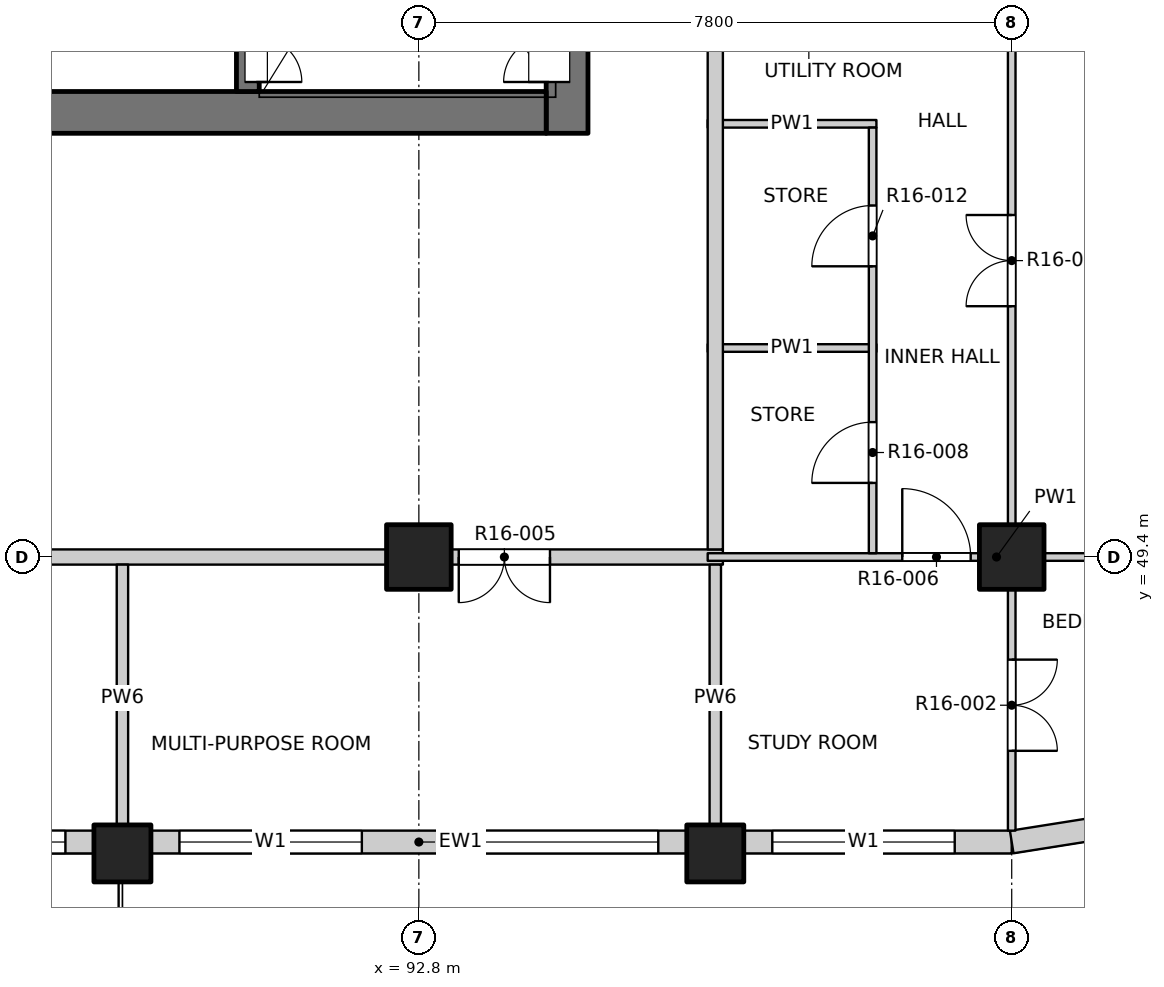
"""IFC4 building model, lengths in metres.
Left out: names, types, materials, properties, quantities, classifications, styles, units other than length and angle.
Written with IfcOpenShell. Run it as: python <this file> out.ifc"""

import sys

from ifc_helpers import new_model, si_unit, direction, frame, frame_2d, origin, origin_2d, place, context, subcontext, project, spatial, rectangle, extrude, element, fill, save


model = new_model("IFC4")
c1 = context("Model", 3, precision=1e-05, world=origin(), true_north=direction((0.0, 1.0)))
c2 = subcontext(c1, "Body", "Model", "MODEL_VIEW")
j1 = project(units=[si_unit("LENGTHUNIT", "METRE"), si_unit("PLANEANGLEUNIT", "RADIAN")], contexts=[c1])
p1 = place(None, origin())
s1 = spatial("IfcSite", under=j1, at=p1, CompositionType="ELEMENT")
p2 = place(p1, origin())
s2 = spatial("IfcBuilding", under=s1, at=p2, CompositionType="ELEMENT")
p3 = place(p2, frame((0.0, 0.0, 169.0)))
s3 = spatial("IfcBuildingStorey", under=s2, at=p3, CompositionType="ELEMENT", Elevation=169.0)
for number, where, z_axis, x_axis in (
    (1, (88.9, 45.5, -0.25), (0.0, 0.0, 1.0), (1.0, 0.0, 0.0)),
    (2, (96.7, 45.5, -0.25), (0.0, 0.0, 1.0), (1.0, 0.0, 0.0)),
):
    element("IfcColumn", number, at=place(p3, frame(where, z_axis=z_axis, x_axis=x_axis)), inside=s3, PredefinedType="COLUMN", context=c2, shape_type="SweptSolid", body=[
        extrude(rectangle(XDim=0.75, YDim=0.75, at=origin_2d()), origin(), (0.0, 0.0, 1.0), 3.35),
    ])
for number, where, z_axis, x_axis in (
    (3, (92.8, 49.4, -0.25), (0.0, 0.0, 1.0), (1.0, 0.0, 0.0)),
    (4, (100.6, 49.4, -0.25), (0.0, 0.0, 1.0), (1.0, 0.0, 0.0)),
):
    element("IfcColumn", number, at=place(p3, frame(where, z_axis=z_axis, x_axis=x_axis)), inside=s3, PredefinedType="COLUMN", context=c2, shape_type="SweptSolid", body=[
        extrude(rectangle(XDim=0.85, YDim=0.85, at=origin_2d()), origin(), (0.0, 0.0, 1.0), 3.35),
    ])
p4 = place(p3, frame((94.75, 54.975, -0.25), z_axis=(0.0, 0.0, 1.0), x_axis=(0.0, 1.0, 0.0)))
e5 = element("IfcWall", 5, at=p4, inside=s3, PredefinedType="SOLIDWALL", context=c2, shape_type="SweptSolid", body=[
    extrude(rectangle(XDim=6.975, YDim=0.55, at=frame_2d((3.487, 0.0))), origin(), (0.0, 0.0, 1.0), 3.35),
])
p5 = place(p4, frame((0.675, 0.0, 0.25)))
e6 = element("IfcOpeningElement", 6, at=p5, cuts=e5, PredefinedType="OPENING", context=c2, shape_type="SweptSolid", body=[
    extrude(rectangle(XDim=1.2, YDim=2.1, at=frame_2d((0.6, 1.05))), frame((0.0, 0.285, 0.0), z_axis=(0.0, -1.0, 0.0), x_axis=(1.0, 0.0, 0.0)), (0.0, 0.0, 1.0), 0.57),
])
p6 = place(p3, frame((75.525, 55.25, -0.25), z_axis=(0.0, 0.0, 1.0), x_axis=(1.0, 0.0, 0.0)))
e7 = element("IfcWall", 7, at=p6, inside=s3, PredefinedType="SOLIDWALL", context=c2, shape_type="SweptSolid", body=[
    extrude(rectangle(XDim=18.95, YDim=0.55, at=frame_2d((9.475, 0.0))), origin(), (0.0, 0.0, 1.0), 3.35),
])
p7 = place(p6, frame((8.725, 0.0, 0.25)))
e8 = element("IfcOpeningElement", 8, at=p7, cuts=e7, PredefinedType="OPENING", context=c2, shape_type="SweptSolid", body=[
    extrude(rectangle(XDim=1.5, YDim=2.1, at=frame_2d((0.75, 1.05))), frame((0.0, 0.285, 0.0), z_axis=(0.0, -1.0, 0.0), x_axis=(1.0, 0.0, 0.0)), (0.0, 0.0, 1.0), 0.57),
])
p8 = place(p3, frame((90.55, 55.525, -0.25), z_axis=(0.0, 0.0, 1.0), x_axis=(0.0, 1.0, 0.0)))
e9 = element("IfcWall", 9, at=p8, inside=s3, PredefinedType="SOLIDWALL", context=c2, shape_type="SweptSolid", body=[
    extrude(rectangle(XDim=6.425, YDim=0.3, at=frame_2d((3.212, 0.0))), origin(), (0.0, 0.0, 1.0), 3.35),
])
p9 = place(p8, frame((0.125, 0.0, 0.25)))
e10 = element("IfcOpeningElement", 10, at=p9, cuts=e9, PredefinedType="OPENING", context=c2, shape_type="SweptSolid", body=[
    extrude(rectangle(XDim=1.2, YDim=2.1, at=frame_2d((0.6, 1.05))), frame((0.0, 0.16, 0.0), z_axis=(0.0, -1.0, 0.0), x_axis=(1.0, 0.0, 0.0)), (0.0, 0.0, 1.0), 0.32),
])
p10 = place(p3, frame((81.475, 45.65, 0.0), z_axis=(0.0, 0.0, 1.0), x_axis=(1.0, 0.0, 0.0)))
e11 = element("IfcWall", 11, at=p10, inside=s3, PredefinedType="SOLIDWALL", context=c2, shape_type="SweptSolid", body=[
    extrude(rectangle(XDim=7.05, YDim=0.3, at=frame_2d((3.525, 0.0))), origin(), (0.0, 0.0, 1.0), 3.1),
])
p11 = place(p10, frame((0.675, 0.0, 0.0)))
e12 = element("IfcOpeningElement", 12, at=p11, cuts=e11, PredefinedType="OPENING", context=c2, shape_type="SweptSolid", body=[
    extrude(rectangle(XDim=1.8, YDim=2.4, at=frame_2d((0.9, 1.2))), frame((0.0, 0.16, 0.0), z_axis=(0.0, -1.0, 0.0), x_axis=(1.0, 0.0, 0.0)), (0.0, 0.0, 1.0), 0.32),
])
p12 = place(p10, frame((4.275, 0.0, 0.9)))
e13 = element("IfcOpeningElement", 13, at=p12, cuts=e11, PredefinedType="OPENING", context=c2, shape_type="SweptSolid", body=[
    extrude(rectangle(XDim=2.4, YDim=1.8, at=frame_2d((1.2, 0.9))), frame((0.0, 0.16, 0.0), z_axis=(0.0, -1.0, 0.0), x_axis=(1.0, 0.0, 0.0)), (0.0, 0.0, 1.0), 0.32),
])
p13 = place(p3, frame((89.275, 45.65, 0.0), z_axis=(0.0, 0.0, 1.0), x_axis=(1.0, 0.0, 0.0)))
e14 = element("IfcWall", 14, at=p13, inside=s3, PredefinedType="SOLIDWALL", context=c2, shape_type="SweptSolid", body=[
    extrude(rectangle(XDim=7.05, YDim=0.3, at=frame_2d((3.525, 0.0))), origin(), (0.0, 0.0, 1.0), 3.1),
])
p14 = place(p13, frame((0.375, 0.0, 0.9)))
e15 = element("IfcOpeningElement", 15, at=p14, cuts=e14, PredefinedType="OPENING", context=c2, shape_type="SweptSolid", body=[
    extrude(rectangle(XDim=2.4, YDim=1.8, at=frame_2d((1.2, 0.9))), frame((0.0, 0.16, 0.0), z_axis=(0.0, -1.0, 0.0), x_axis=(1.0, 0.0, 0.0)), (0.0, 0.0, 1.0), 0.32),
])
p15 = place(p13, frame((4.275, 0.0, 0.9)))
e16 = element("IfcOpeningElement", 16, at=p15, cuts=e14, PredefinedType="OPENING", context=c2, shape_type="SweptSolid", body=[
    extrude(rectangle(XDim=2.4, YDim=1.8, at=frame_2d((1.2, 0.9))), frame((0.0, 0.16, 0.0), z_axis=(0.0, -1.0, 0.0), x_axis=(1.0, 0.0, 0.0)), (0.0, 0.0, 1.0), 0.32),
])
p16 = place(p3, frame((97.075, 45.65, 0.0), z_axis=(0.0, 0.0, 1.0), x_axis=(1.0, 0.0, 0.0)))
e17 = element("IfcWall", 17, at=p16, inside=s3, PredefinedType="SOLIDWALL", context=c2, shape_type="SweptSolid", body=[
    extrude(rectangle(XDim=3.525, YDim=0.3, at=frame_2d((1.763, 0.0))), origin(), (0.0, 0.0, 1.0), 3.1),
])
p17 = place(p16, frame((0.375, 0.0, 0.9)))
e18 = element("IfcOpeningElement", 18, at=p17, cuts=e17, PredefinedType="OPENING", context=c2, shape_type="SweptSolid", body=[
    extrude(rectangle(XDim=2.4, YDim=1.8, at=frame_2d((1.2, 0.9))), frame((0.0, 0.16, 0.0), z_axis=(0.0, -1.0, 0.0), x_axis=(1.0, 0.0, 0.0)), (0.0, 0.0, 1.0), 0.32),
])
p18 = place(p3, frame((100.6, 45.65, 0.0), z_axis=(0.0, 0.0, 1.0), x_axis=(0.987678452879, 0.156496880861, 0.0)))
e19 = element("IfcWall", 19, at=p18, inside=s3, PredefinedType="SOLIDWALL", context=c2, shape_type="SweptSolid", body=[
    extrude(rectangle(XDim=1.173, YDim=0.3, at=frame_2d((0.586, 0.0))), origin(), (0.0, 0.0, 1.0), 3.1),
])
p19 = place(p3, frame((73.2, 49.4, 0.0), z_axis=(0.0, 0.0, 1.0), x_axis=(1.0, 0.0, 0.0)))
e20 = element("IfcWall", 20, at=p19, inside=s3, PredefinedType="PARTITIONING", context=c2, shape_type="SweptSolid", body=[
    extrude(rectangle(XDim=23.6, YDim=0.2, at=frame_2d((11.8, 0.0))), origin(), (0.0, 0.0, 1.0), 3.1),
])
p20 = place(p19, frame((7.3, 0.0, 0.0)))
e21 = element("IfcOpeningElement", 21, at=p20, cuts=e20, PredefinedType="OPENING", context=c2, shape_type="SweptSolid", body=[
    extrude(rectangle(XDim=1.2, YDim=2.1, at=frame_2d((0.6, 1.05))), frame((0.0, 0.11, 0.0), z_axis=(0.0, -1.0, 0.0), x_axis=(1.0, 0.0, 0.0)), (0.0, 0.0, 1.0), 0.22),
])
p21 = place(p19, frame((20.125, 0.0, 0.0)))
e22 = element("IfcOpeningElement", 22, at=p21, cuts=e20, PredefinedType="OPENING", context=c2, shape_type="SweptSolid", body=[
    extrude(rectangle(XDim=1.2, YDim=2.1, at=frame_2d((0.6, 1.05))), frame((0.0, 0.11, 0.0), z_axis=(0.0, -1.0, 0.0), x_axis=(1.0, 0.0, 0.0)), (0.0, 0.0, 1.0), 0.22),
])
p22 = place(p3, frame((96.6, 49.4, 0.0), z_axis=(0.0, 0.0, 1.0), x_axis=(1.0, 0.0, 0.0)))
e23 = element("IfcWall", 23, at=p22, inside=s3, PredefinedType="PARTITIONING", context=c2, shape_type="SweptSolid", body=[
    extrude(rectangle(XDim=7.6, YDim=0.1, at=frame_2d((3.8, 0.0))), origin(), (0.0, 0.0, 1.0), 3.1),
])
p23 = place(p22, frame((2.56, 0.0, 0.0)))
e24 = element("IfcOpeningElement", 24, at=p23, cuts=e23, PredefinedType="OPENING", context=c2, shape_type="SweptSolid", body=[
    extrude(rectangle(XDim=0.9, YDim=2.1, at=frame_2d((0.45, 1.05))), frame((0.0, 0.06, 0.0), z_axis=(0.0, -1.0, 0.0), x_axis=(1.0, 0.0, 0.0)), (0.0, 0.0, 1.0), 0.12),
])
for number, where, z_axis, x_axis in (
    (25, (96.6, 52.15, 0.0), (0.0, 0.0, 1.0), (1.0, 0.0, 0.0)),
    (26, (96.6, 55.1, 0.0), (0.0, 0.0, 1.0), (1.0, 0.0, 0.0)),
):
    element("IfcWall", number, at=place(p3, frame(where, z_axis=z_axis, x_axis=x_axis)), inside=s3, PredefinedType="PARTITIONING", context=c2, shape_type="SweptSolid", body=[
        extrude(rectangle(XDim=2.22, YDim=0.1, at=frame_2d((1.11, 0.0))), origin(), (0.0, 0.0, 1.0), 3.1),
    ])
for number, where, z_axis, x_axis in (
    (27, (88.9, 45.8, 0.0), (0.0, 0.0, 1.0), (0.0, 1.0, 0.0)),
    (28, (96.7, 45.8, 0.0), (0.0, 0.0, 1.0), (0.0, 1.0, 0.0)),
):
    element("IfcWall", number, at=place(p3, frame(where, z_axis=z_axis, x_axis=x_axis)), inside=s3, PredefinedType="PARTITIONING", context=c2, shape_type="SweptSolid", body=[
        extrude(rectangle(XDim=3.5, YDim=0.15, at=frame_2d((1.75, 0.0))), origin(), (0.0, 0.0, 1.0), 3.1),
    ])
p24 = place(p3, frame((96.7, 49.5, 0.0), z_axis=(0.0, 0.0, 1.0), x_axis=(0.0, 1.0, 0.0)))
e29 = element("IfcWall", 29, at=p24, inside=s3, PredefinedType="PARTITIONING", context=c2, shape_type="SweptSolid", body=[
    extrude(rectangle(XDim=34.7, YDim=0.2, at=frame_2d((17.35, 0.0))), origin(), (0.0, 0.0, 1.0), 3.1),
])
p25 = place(p24, frame((6.875, 0.0, 0.0)))
e30 = element("IfcOpeningElement", 30, at=p25, cuts=e29, PredefinedType="OPENING", context=c2, shape_type="SweptSolid", body=[
    extrude(rectangle(XDim=1.0, YDim=2.1, at=frame_2d((0.5, 1.05))), frame((0.0, 0.11, 0.0), z_axis=(0.0, -1.0, 0.0), x_axis=(1.0, 0.0, 0.0)), (0.0, 0.0, 1.0), 0.22),
])
p26 = place(p24, frame((18.025, 0.0, 0.0)))
e31 = element("IfcOpeningElement", 31, at=p26, cuts=e29, PredefinedType="OPENING", context=c2, shape_type="SweptSolid", body=[
    extrude(rectangle(XDim=1.0, YDim=2.1, at=frame_2d((0.5, 1.05))), frame((0.0, 0.11, 0.0), z_axis=(0.0, -1.0, 0.0), x_axis=(1.0, 0.0, 0.0)), (0.0, 0.0, 1.0), 0.22),
])
p27 = place(p3, frame((98.77, 49.45, 0.0), z_axis=(0.0, 0.0, 1.0), x_axis=(0.0, 1.0, 0.0)))
e32 = element("IfcWall", 32, at=p27, inside=s3, PredefinedType="PARTITIONING", context=c2, shape_type="SweptSolid", body=[
    extrude(rectangle(XDim=5.6, YDim=0.1, at=frame_2d((2.8, 0.0))), origin(), (0.0, 0.0, 1.0), 3.1),
])
p28 = place(p27, frame((0.925, 0.0, 0.0)))
e33 = element("IfcOpeningElement", 33, at=p28, cuts=e32, PredefinedType="OPENING", context=c2, shape_type="SweptSolid", body=[
    extrude(rectangle(XDim=0.8, YDim=2.1, at=frame_2d((0.4, 1.05))), frame((0.0, 0.06, 0.0), z_axis=(0.0, -1.0, 0.0), x_axis=(1.0, 0.0, 0.0)), (0.0, 0.0, 1.0), 0.12),
])
p29 = place(p27, frame((3.775, 0.0, 0.0)))
e34 = element("IfcOpeningElement", 34, at=p29, cuts=e32, PredefinedType="OPENING", context=c2, shape_type="SweptSolid", body=[
    extrude(rectangle(XDim=0.8, YDim=2.1, at=frame_2d((0.4, 1.05))), frame((0.0, 0.06, 0.0), z_axis=(0.0, -1.0, 0.0), x_axis=(1.0, 0.0, 0.0)), (0.0, 0.0, 1.0), 0.12),
])
p30 = place(p3, frame((100.6, 45.8, 0.0), z_axis=(0.0, 0.0, 1.0), x_axis=(0.0, 1.0, 0.0)))
e35 = element("IfcWall", 35, at=p30, inside=s3, PredefinedType="PARTITIONING", context=c2, shape_type="SweptSolid", body=[
    extrude(rectangle(XDim=38.4, YDim=0.1, at=frame_2d((19.2, 0.0))), origin(), (0.0, 0.0, 1.0), 3.1),
])
p31 = place(p30, frame((1.05, 0.0, 0.0)))
e36 = element("IfcOpeningElement", 36, at=p31, cuts=e35, PredefinedType="OPENING", context=c2, shape_type="SweptSolid", body=[
    extrude(rectangle(XDim=1.2, YDim=2.1, at=frame_2d((0.6, 1.05))), frame((0.0, 0.06, 0.0), z_axis=(0.0, -1.0, 0.0), x_axis=(1.0, 0.0, 0.0)), (0.0, 0.0, 1.0), 0.12),
])
p32 = place(p30, frame((6.9, 0.0, 0.0)))
e37 = element("IfcOpeningElement", 37, at=p32, cuts=e35, PredefinedType="OPENING", context=c2, shape_type="SweptSolid", body=[
    extrude(rectangle(XDim=1.2, YDim=2.1, at=frame_2d((0.6, 1.05))), frame((0.0, 0.06, 0.0), z_axis=(0.0, -1.0, 0.0), x_axis=(1.0, 0.0, 0.0)), (0.0, 0.0, 1.0), 0.12),
])
p33 = place(p30, frame((12.9, 0.0, 0.0)))
e38 = element("IfcOpeningElement", 38, at=p33, cuts=e35, PredefinedType="OPENING", context=c2, shape_type="SweptSolid", body=[
    extrude(rectangle(XDim=0.9, YDim=2.1, at=frame_2d((0.45, 1.05))), frame((0.0, 0.06, 0.0), z_axis=(0.0, -1.0, 0.0), x_axis=(1.0, 0.0, 0.0)), (0.0, 0.0, 1.0), 0.12),
])
p34 = place(p30, frame((16.8, 0.0, 0.0)))
e39 = element("IfcOpeningElement", 39, at=p34, cuts=e35, PredefinedType="OPENING", context=c2, shape_type="SweptSolid", body=[
    extrude(rectangle(XDim=0.9, YDim=2.1, at=frame_2d((0.45, 1.05))), frame((0.0, 0.06, 0.0), z_axis=(0.0, -1.0, 0.0), x_axis=(1.0, 0.0, 0.0)), (0.0, 0.0, 1.0), 0.12),
])
p35 = place(p30, frame((20.7, 0.0, 0.0)))
e40 = element("IfcOpeningElement", 40, at=p35, cuts=e35, PredefinedType="OPENING", context=c2, shape_type="SweptSolid", body=[
    extrude(rectangle(XDim=0.9, YDim=2.1, at=frame_2d((0.45, 1.05))), frame((0.0, 0.06, 0.0), z_axis=(0.0, -1.0, 0.0), x_axis=(1.0, 0.0, 0.0)), (0.0, 0.0, 1.0), 0.12),
])
p36 = place(p30, frame((24.6, 0.0, 0.0)))
e41 = element("IfcOpeningElement", 41, at=p36, cuts=e35, PredefinedType="OPENING", context=c2, shape_type="SweptSolid", body=[
    extrude(rectangle(XDim=0.9, YDim=2.1, at=frame_2d((0.45, 1.05))), frame((0.0, 0.06, 0.0), z_axis=(0.0, -1.0, 0.0), x_axis=(1.0, 0.0, 0.0)), (0.0, 0.0, 1.0), 0.12),
])
p37 = place(p30, frame((28.5, 0.0, 0.0)))
e42 = element("IfcOpeningElement", 42, at=p37, cuts=e35, PredefinedType="OPENING", context=c2, shape_type="SweptSolid", body=[
    extrude(rectangle(XDim=0.9, YDim=2.1, at=frame_2d((0.45, 1.05))), frame((0.0, 0.06, 0.0), z_axis=(0.0, -1.0, 0.0), x_axis=(1.0, 0.0, 0.0)), (0.0, 0.0, 1.0), 0.12),
])
p38 = place(p30, frame((32.4, 0.0, 0.0)))
e43 = element("IfcOpeningElement", 43, at=p38, cuts=e35, PredefinedType="OPENING", context=c2, shape_type="SweptSolid", body=[
    extrude(rectangle(XDim=0.9, YDim=2.1, at=frame_2d((0.45, 1.05))), frame((0.0, 0.06, 0.0), z_axis=(0.0, -1.0, 0.0), x_axis=(1.0, 0.0, 0.0)), (0.0, 0.0, 1.0), 0.12),
])
p39 = place(p30, frame((36.15, 0.0, 0.0)))
e44 = element("IfcOpeningElement", 44, at=p39, cuts=e35, PredefinedType="OPENING", context=c2, shape_type="SweptSolid", body=[
    extrude(rectangle(XDim=1.2, YDim=2.1, at=frame_2d((0.6, 1.05))), frame((0.0, 0.06, 0.0), z_axis=(0.0, -1.0, 0.0), x_axis=(1.0, 0.0, 0.0)), (0.0, 0.0, 1.0), 0.12),
])
p40 = place(p12, origin())
e45 = element("IfcWindow", 45, at=p40, inside=s3, PartitioningType="DOUBLE_PANEL_VERTICAL", PredefinedType="WINDOW", context=c2, shape_type="SweptSolid", body=[
    extrude(rectangle(XDim=2.4, YDim=1.8, at=frame_2d((1.2, 0.9))), frame((0.0, 0.03, 0.0), z_axis=(0.0, -1.0, 0.0), x_axis=(1.0, 0.0, 0.0)), (0.0, 0.0, 1.0), 0.06),
])
fill(e13, e45)
p41 = place(p14, origin())
e46 = element("IfcWindow", 46, at=p41, inside=s3, PartitioningType="DOUBLE_PANEL_VERTICAL", PredefinedType="WINDOW", context=c2, shape_type="SweptSolid", body=[
    extrude(rectangle(XDim=2.4, YDim=1.8, at=frame_2d((1.2, 0.9))), frame((0.0, 0.03, 0.0), z_axis=(0.0, -1.0, 0.0), x_axis=(1.0, 0.0, 0.0)), (0.0, 0.0, 1.0), 0.06),
])
fill(e15, e46)
p42 = place(p15, origin())
e47 = element("IfcWindow", 47, at=p42, inside=s3, PartitioningType="DOUBLE_PANEL_VERTICAL", PredefinedType="WINDOW", context=c2, shape_type="SweptSolid", body=[
    extrude(rectangle(XDim=2.4, YDim=1.8, at=frame_2d((1.2, 0.9))), frame((0.0, 0.03, 0.0), z_axis=(0.0, -1.0, 0.0), x_axis=(1.0, 0.0, 0.0)), (0.0, 0.0, 1.0), 0.06),
])
fill(e16, e47)
p43 = place(p17, origin())
e48 = element("IfcWindow", 48, at=p43, inside=s3, PartitioningType="DOUBLE_PANEL_VERTICAL", PredefinedType="WINDOW", context=c2, shape_type="SweptSolid", body=[
    extrude(rectangle(XDim=2.4, YDim=1.8, at=frame_2d((1.2, 0.9))), frame((0.0, 0.03, 0.0), z_axis=(0.0, -1.0, 0.0), x_axis=(1.0, 0.0, 0.0)), (0.0, 0.0, 1.0), 0.06),
])
fill(e18, e48)
p44 = place(p31, origin())
e49 = element("IfcDoor", 49, at=p44, inside=s3, OperationType="DOUBLE_DOOR_SINGLE_SWING", PredefinedType="DOOR", context=c2, shape_type="SweptSolid", body=[
    extrude(rectangle(XDim=1.2, YDim=2.1, at=frame_2d((0.6, 1.05))), frame((0.0, 0.025, 0.0), z_axis=(0.0, -1.0, 0.0), x_axis=(1.0, 0.0, 0.0)), (0.0, 0.0, 1.0), 0.05),
])
fill(e36, e49)
p45 = place(p21, origin())
e50 = element("IfcDoor", 50, at=p45, inside=s3, OperationType="DOUBLE_DOOR_SINGLE_SWING", PredefinedType="DOOR", context=c2, shape_type="SweptSolid", body=[
    extrude(rectangle(XDim=1.2, YDim=2.1, at=frame_2d((0.6, 1.05))), frame((0.0, 0.025, 0.0), z_axis=(0.0, -1.0, 0.0), x_axis=(1.0, 0.0, 0.0)), (0.0, 0.0, 1.0), 0.05),
])
fill(e22, e50)
p46 = place(p23, origin())
e51 = element("IfcDoor", 51, at=p46, inside=s3, OperationType="SINGLE_SWING_LEFT", PredefinedType="DOOR", context=c2, shape_type="SweptSolid", body=[
    extrude(rectangle(XDim=0.9, YDim=2.1, at=frame_2d((0.45, 1.05))), frame((0.0, 0.025, 0.0), z_axis=(0.0, -1.0, 0.0), x_axis=(1.0, 0.0, 0.0)), (0.0, 0.0, 1.0), 0.05),
])
fill(e24, e51)
p47 = place(p28, origin())
e52 = element("IfcDoor", 52, at=p47, inside=s3, OperationType="SINGLE_SWING_LEFT", PredefinedType="DOOR", context=c2, shape_type="SweptSolid", body=[
    extrude(rectangle(XDim=0.8, YDim=2.1, at=frame_2d((0.4, 1.05))), frame((0.0, 0.025, 0.0), z_axis=(0.0, -1.0, 0.0), x_axis=(1.0, 0.0, 0.0)), (0.0, 0.0, 1.0), 0.05),
])
fill(e33, e52)
p48 = place(p32, origin())
e53 = element("IfcDoor", 53, at=p48, inside=s3, OperationType="DOUBLE_DOOR_SINGLE_SWING", PredefinedType="DOOR", context=c2, shape_type="SweptSolid", body=[
    extrude(rectangle(XDim=1.2, YDim=2.1, at=frame_2d((0.6, 1.05))), frame((0.0, 0.025, 0.0), z_axis=(0.0, -1.0, 0.0), x_axis=(1.0, 0.0, 0.0)), (0.0, 0.0, 1.0), 0.05),
])
fill(e37, e53)
p49 = place(p29, origin())
e54 = element("IfcDoor", 54, at=p49, inside=s3, OperationType="SINGLE_SWING_LEFT", PredefinedType="DOOR", context=c2, shape_type="SweptSolid", body=[
    extrude(rectangle(XDim=0.8, YDim=2.1, at=frame_2d((0.4, 1.05))), frame((0.0, 0.025, 0.0), z_axis=(0.0, -1.0, 0.0), x_axis=(1.0, 0.0, 0.0)), (0.0, 0.0, 1.0), 0.05),
])
fill(e34, e54)
p50 = place(p9, origin())
e55 = element("IfcDoor", 55, at=p50, inside=s3, OperationType="DOUBLE_DOOR_SINGLE_SWING", PredefinedType="DOOR", context=c2, shape_type="SweptSolid", body=[
    extrude(rectangle(XDim=1.2, YDim=2.1, at=frame_2d((0.6, 1.05))), frame((0.0, -0.085, 0.0), z_axis=(0.0, -1.0, 0.0), x_axis=(1.0, 0.0, 0.0)), (0.0, 0.0, 1.0), 0.05),
])
fill(e10, e55)
p51 = place(p5, origin())
e56 = element("IfcDoor", 56, at=p51, inside=s3, OperationType="DOUBLE_DOOR_SINGLE_SWING", PredefinedType="DOOR", context=c2, shape_type="SweptSolid", body=[
    extrude(rectangle(XDim=1.2, YDim=2.1, at=frame_2d((0.6, 1.05))), frame((0.0, 0.26, 0.0), z_axis=(0.0, -1.0, 0.0), x_axis=(1.0, 0.0, 0.0)), (0.0, 0.0, 1.0), 0.05),
])
fill(e6, e56)
save(model, sys.argv[1])
